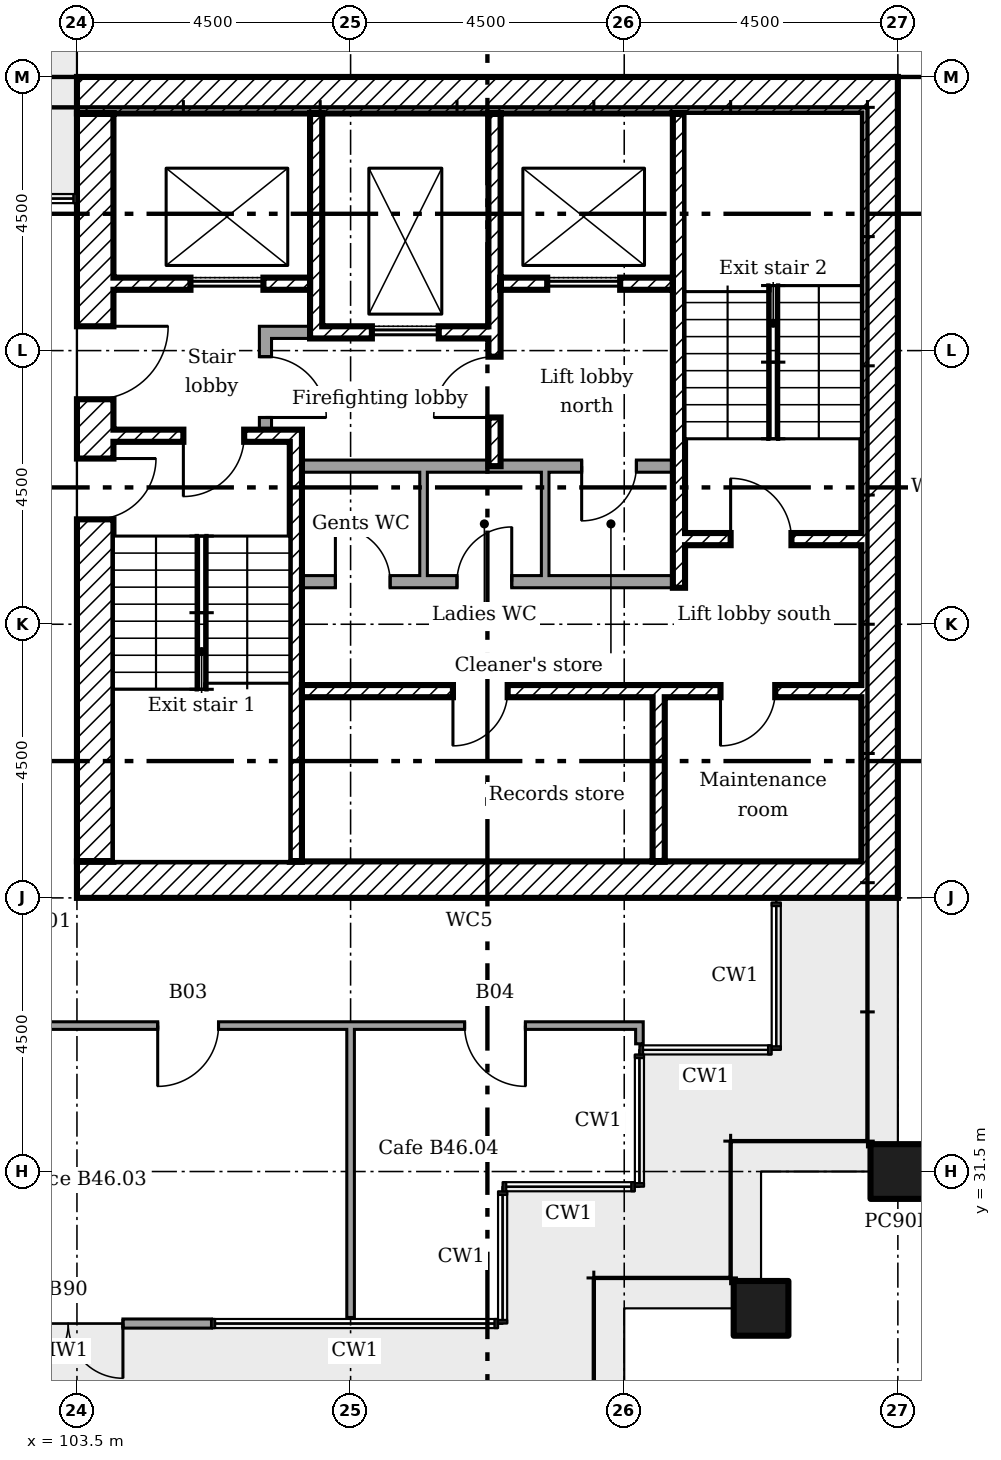
"""IFC4 building model, lengths in metres.
Left out: names, types, materials, properties, quantities, classifications, styles, units other than length and angle.
Written with IfcOpenShell. Run it as: python <this file> out.ifc"""

import sys

from ifc_helpers import new_model, si_unit, direction, frame, frame_2d, origin, origin_2d, place, context, subcontext, project, spatial, rectangle, extrude, element, fill, save


model = new_model("IFC4")
c1 = context("Model", 3, precision=1e-05, world=origin(), true_north=direction((0.0, 1.0)))
c2 = subcontext(c1, "Body", "Model", "MODEL_VIEW")
j1 = project(units=[si_unit("LENGTHUNIT", "METRE"), si_unit("PLANEANGLEUNIT", "RADIAN")], contexts=[c1])
p1 = place(None, origin())
s1 = spatial("IfcSite", under=j1, at=p1, CompositionType="ELEMENT")
p2 = place(p1, origin())
s2 = spatial("IfcBuilding", under=s1, at=p2, CompositionType="ELEMENT")
p3 = place(p2, frame((0.0, 0.0, 183.4)))
s3 = spatial("IfcBuildingStorey", under=s2, at=p3, CompositionType="ELEMENT", Elevation=183.4)
for number, where in (
    (1, (114.75, 29.25, 0.0)),
    (2, (117.0, 31.5, 0.0)),
):
    element("IfcColumn", number, at=place(p3, frame(where)), inside=s3, PredefinedType="COLUMN", context=c2, shape_type="SweptSolid", body=[
        extrude(rectangle(XDim=0.9, YDim=0.9, at=origin_2d()), origin(), (0.0, 0.0, 1.0), 3.6),
    ])
p4 = place(p3, frame((101.0, 29.0, 0.0)))
e3 = element("IfcWall", 3, at=p4, inside=s3, PredefinedType="SOLIDWALL", context=c2, shape_type="SweptSolid", body=[
    extrude(rectangle(XDim=4.712, YDim=0.15, at=frame_2d((2.356, 0.0))), origin(), (0.0, 0.0, 1.0), 3.45),
])
p5 = place(p4, frame((1.456, 0.0, 0.0)))
e4 = element("IfcOpeningElement", 4, at=p5, cuts=e3, PredefinedType="OPENING", context=c2, shape_type="SweptSolid", body=[
    extrude(rectangle(XDim=1.8, YDim=2.4, at=frame_2d((0.9, 1.2))), frame((0.0, 0.085, 0.0), z_axis=(0.0, -1.0, 0.0), x_axis=(1.0, 0.0, 0.0)), (0.0, 0.0, 1.0), 0.17),
])
p6 = place(p3, frame((116.7, 36.0, 0.0), z_axis=(0.0, 0.0, 1.0), x_axis=(0.0, 1.0, 0.0)))
e5 = element("IfcWall", 5, at=p6, inside=s3, PredefinedType="SHEAR", context=c2, shape_type="SweptSolid", body=[
    extrude(rectangle(XDim=13.5, YDim=0.6, at=frame_2d((6.75, 0.0))), origin(), (0.0, 0.0, 1.0), 3.35),
])
for number, where in (
    (6, (103.5, 49.2, 0.0)),
    (7, (103.5, 36.3, 0.0)),
):
    element("IfcWall", number, at=place(p3, frame(where)), inside=s3, PredefinedType="SHEAR", context=c2, shape_type="SweptSolid", body=[
        extrude(rectangle(XDim=12.9, YDim=0.6, at=frame_2d((6.45, 0.0))), origin(), (0.0, 0.0, 1.0), 3.35),
    ])
p7 = place(p3, frame((103.8, 36.6, 0.0), z_axis=(0.0, 0.0, 1.0), x_axis=(0.0, 1.0, 0.0)))
e8 = element("IfcWall", 8, at=p7, inside=s3, PredefinedType="SHEAR", context=c2, shape_type="SweptSolid", body=[
    extrude(rectangle(XDim=12.3, YDim=0.6, at=frame_2d((6.15, 0.0))), origin(), (0.0, 0.0, 1.0), 3.35),
])
p8 = place(p7, frame((7.6, 0.0, 0.0)))
e9 = element("IfcOpeningElement", 9, at=p8, cuts=e8, PredefinedType="OPENING", context=c2, shape_type="SweptSolid", body=[
    extrude(rectangle(XDim=1.2, YDim=2.1, at=frame_2d((0.6, 1.05))), frame((0.0, 0.31, 0.0), z_axis=(0.0, -1.0, 0.0), x_axis=(1.0, 0.0, 0.0)), (0.0, 0.0, 1.0), 0.62),
])
p9 = place(p7, frame((5.625, 0.0, 0.0)))
e10 = element("IfcOpeningElement", 10, at=p9, cuts=e8, PredefinedType="OPENING", context=c2, shape_type="SweptSolid", body=[
    extrude(rectangle(XDim=1.0, YDim=2.1, at=frame_2d((0.5, 1.05))), frame((0.0, 0.31, 0.0), z_axis=(0.0, -1.0, 0.0), x_axis=(1.0, 0.0, 0.0)), (0.0, 0.0, 1.0), 0.62),
])
p10 = place(p3, frame((107.433, 48.9, 0.0), z_axis=(0.0, 0.0, 1.0), x_axis=(0.0, -1.0, 0.0)))
e11 = element("IfcWall", 11, at=p10, inside=s3, PredefinedType="SHEAR", context=c2, shape_type="SweptSolid", body=[
    extrude(rectangle(XDim=3.7, YDim=0.2, at=frame_2d((1.85, 0.0))), origin(), (0.0, 0.0, 1.0), 3.35),
])
p11 = place(p3, frame((110.367, 48.9, 0.0), z_axis=(0.0, 0.0, 1.0), x_axis=(0.0, -1.0, 0.0)))
e12 = element("IfcWall", 12, at=p11, inside=s3, PredefinedType="SHEAR", context=c2, shape_type="SweptSolid", body=[
    extrude(rectangle(XDim=5.8, YDim=0.2, at=frame_2d((2.9, 0.0))), origin(), (0.0, 0.0, 1.0), 3.35),
])
p12 = place(p11, frame((4.0, 0.0, 0.0)))
e13 = element("IfcOpeningElement", 13, at=p12, cuts=e12, PredefinedType="OPENING", context=c2, shape_type="SweptSolid", body=[
    extrude(rectangle(XDim=1.0, YDim=2.1, at=frame_2d((0.5, 1.05))), frame((0.0, 0.11, 0.0), z_axis=(0.0, -1.0, 0.0), x_axis=(1.0, 0.0, 0.0)), (0.0, 0.0, 1.0), 0.22),
])
p13 = place(p3, frame((113.067, 36.6, 0.0), z_axis=(0.0, 0.0, 1.0), x_axis=(0.0, 1.0, 0.0)))
e14 = element("IfcWall", 14, at=p13, inside=s3, PredefinedType="SHEAR", context=c2, shape_type="SweptSolid", body=[
    extrude(rectangle(XDim=2.7, YDim=0.2, at=frame_2d((1.35, 0.0))), origin(), (0.0, 0.0, 1.0), 3.35),
])
p14 = place(p3, frame((106.5, 45.3, 0.0)))
e15 = element("IfcWall", 15, at=p14, inside=s3, PredefinedType="PARTITIONING", context=c2, shape_type="SweptSolid", body=[
    extrude(rectangle(XDim=0.833, YDim=0.2, at=frame_2d((0.417, 0.0))), origin(), (0.0, 0.0, 1.0), 3.35),
])
p15 = place(p3, frame((106.6, 43.7, 0.0), z_axis=(0.0, 0.0, 1.0), x_axis=(0.0, 1.0, 0.0)))
e16 = element("IfcWall", 16, at=p15, inside=s3, PredefinedType="PARTITIONING", context=c2, shape_type="SweptSolid", body=[
    extrude(rectangle(XDim=1.5, YDim=0.2, at=frame_2d((0.75, 0.0))), origin(), (0.0, 0.0, 1.0), 3.35),
])
p16 = place(p15, frame((0.2, 0.0, 0.0)))
e17 = element("IfcOpeningElement", 17, at=p16, cuts=e16, PredefinedType="OPENING", context=c2, shape_type="SweptSolid", body=[
    extrude(rectangle(XDim=1.0, YDim=2.1, at=frame_2d((0.5, 1.05))), frame((0.0, 0.11, 0.0), z_axis=(0.0, -1.0, 0.0), x_axis=(1.0, 0.0, 0.0)), (0.0, 0.0, 1.0), 0.22),
])
p17 = place(p3, frame((104.1, 46.1, 0.0)))
e18 = element("IfcWall", 18, at=p17, inside=s3, PredefinedType="SHEAR", context=c2, shape_type="SweptSolid", body=[
    extrude(rectangle(XDim=3.233, YDim=0.2, at=frame_2d((1.617, 0.0))), origin(), (0.0, 0.0, 1.0), 3.35),
])
p18 = place(p17, frame((1.267, 0.0, 0.0)))
e19 = element("IfcOpeningElement", 19, at=p18, cuts=e18, PredefinedType="OPENING", context=c2, shape_type="SweptSolid", body=[
    extrude(rectangle(XDim=1.2, YDim=2.1, at=frame_2d((0.6, 1.05))), frame((0.0, 0.11, 0.0), z_axis=(0.0, -1.0, 0.0), x_axis=(1.0, 0.0, 0.0)), (0.0, 0.0, 1.0), 0.22),
])
p19 = place(p3, frame((110.467, 46.1, 0.0)))
e20 = element("IfcWall", 20, at=p19, inside=s3, PredefinedType="SHEAR", context=c2, shape_type="SweptSolid", body=[
    extrude(rectangle(XDim=2.833, YDim=0.2, at=frame_2d((1.417, 0.0))), origin(), (0.0, 0.0, 1.0), 3.35),
])
p20 = place(p19, frame((0.767, 0.0, 0.0)))
e21 = element("IfcOpeningElement", 21, at=p20, cuts=e20, PredefinedType="OPENING", context=c2, shape_type="SweptSolid", body=[
    extrude(rectangle(XDim=1.2, YDim=2.1, at=frame_2d((0.6, 1.05))), frame((0.0, 0.11, 0.0), z_axis=(0.0, -1.0, 0.0), x_axis=(1.0, 0.0, 0.0)), (0.0, 0.0, 1.0), 0.22),
])
p21 = place(p3, frame((107.533, 45.3, 0.0)))
e22 = element("IfcWall", 22, at=p21, inside=s3, PredefinedType="SHEAR", context=c2, shape_type="SweptSolid", body=[
    extrude(rectangle(XDim=2.733, YDim=0.2, at=frame_2d((1.367, 0.0))), origin(), (0.0, 0.0, 1.0), 3.35),
])
p22 = place(p21, frame((0.817, 0.0, 0.0)))
e23 = element("IfcOpeningElement", 23, at=p22, cuts=e22, PredefinedType="OPENING", context=c2, shape_type="SweptSolid", body=[
    extrude(rectangle(XDim=1.1, YDim=2.1, at=frame_2d((0.55, 1.05))), frame((0.0, 0.11, 0.0), z_axis=(0.0, -1.0, 0.0), x_axis=(1.0, 0.0, 0.0)), (0.0, 0.0, 1.0), 0.22),
])
p23 = place(p3, frame((107.2, 39.4, 0.0)))
e24 = element("IfcWall", 24, at=p23, inside=s3, PredefinedType="SHEAR", context=c2, shape_type="SweptSolid", body=[
    extrude(rectangle(XDim=9.2, YDim=0.2, at=frame_2d((4.6, 0.0))), origin(), (0.0, 0.0, 1.0), 3.35),
])
p24 = place(p23, frame((2.483, 0.0, 0.0)))
e25 = element("IfcOpeningElement", 25, at=p24, cuts=e24, PredefinedType="OPENING", context=c2, shape_type="SweptSolid", body=[
    extrude(rectangle(XDim=0.9, YDim=2.1, at=frame_2d((0.45, 1.05))), frame((0.0, 0.11, 0.0), z_axis=(0.0, -1.0, 0.0), x_axis=(1.0, 0.0, 0.0)), (0.0, 0.0, 1.0), 0.22),
])
p25 = place(p23, frame((6.883, 0.0, 0.0)))
e26 = element("IfcOpeningElement", 26, at=p25, cuts=e24, PredefinedType="OPENING", context=c2, shape_type="SweptSolid", body=[
    extrude(rectangle(XDim=0.9, YDim=2.1, at=frame_2d((0.45, 1.05))), frame((0.0, 0.11, 0.0), z_axis=(0.0, -1.0, 0.0), x_axis=(1.0, 0.0, 0.0)), (0.0, 0.0, 1.0), 0.22),
])
p26 = place(p3, frame((107.1, 36.6, 0.0), z_axis=(0.0, 0.0, 1.0), x_axis=(0.0, 1.0, 0.0)))
e27 = element("IfcWall", 27, at=p26, inside=s3, PredefinedType="SHEAR", context=c2, shape_type="SweptSolid", body=[
    extrude(rectangle(XDim=7.1, YDim=0.2, at=frame_2d((3.55, 0.0))), origin(), (0.0, 0.0, 1.0), 3.35),
])
p27 = place(p3, frame((104.1, 43.6, 0.0)))
e28 = element("IfcWall", 28, at=p27, inside=s3, PredefinedType="SHEAR", context=c2, shape_type="SweptSolid", body=[
    extrude(rectangle(XDim=2.9, YDim=0.2, at=frame_2d((1.45, 0.0))), origin(), (0.0, 0.0, 1.0), 3.35),
])
p28 = place(p27, frame((1.15, 0.0, 0.0)))
e29 = element("IfcOpeningElement", 29, at=p28, cuts=e28, PredefinedType="OPENING", context=c2, shape_type="SweptSolid", body=[
    extrude(rectangle(XDim=1.0, YDim=2.1, at=frame_2d((0.5, 1.05))), frame((0.0, 0.11, 0.0), z_axis=(0.0, -1.0, 0.0), x_axis=(1.0, 0.0, 0.0)), (0.0, 0.0, 1.0), 0.22),
])
p29 = place(p3, frame((113.5, 41.9, 0.0)))
e30 = element("IfcWall", 30, at=p29, inside=s3, PredefinedType="SHEAR", context=c2, shape_type="SweptSolid", body=[
    extrude(rectangle(XDim=2.9, YDim=0.2, at=frame_2d((1.45, 0.0))), origin(), (0.0, 0.0, 1.0), 3.35),
])
p30 = place(p29, frame((0.75, 0.0, 0.0)))
e31 = element("IfcOpeningElement", 31, at=p30, cuts=e30, PredefinedType="OPENING", context=c2, shape_type="SweptSolid", body=[
    extrude(rectangle(XDim=1.0, YDim=2.1, at=frame_2d((0.5, 1.05))), frame((0.0, 0.11, 0.0), z_axis=(0.0, -1.0, 0.0), x_axis=(1.0, 0.0, 0.0)), (0.0, 0.0, 1.0), 0.22),
])
p31 = place(p3, frame((113.4, 41.1, 0.0), z_axis=(0.0, 0.0, 1.0), x_axis=(0.0, 1.0, 0.0)))
e32 = element("IfcWall", 32, at=p31, inside=s3, PredefinedType="SHEAR", context=c2, shape_type="SweptSolid", body=[
    extrude(rectangle(XDim=7.8, YDim=0.2, at=frame_2d((3.9, 0.0))), origin(), (0.0, 0.0, 1.0), 3.35),
])
p32 = place(p3, frame((107.2, 43.1, 0.0)))
e33 = element("IfcWall", 33, at=p32, inside=s3, PredefinedType="PARTITIONING", context=c2, shape_type="SweptSolid", body=[
    extrude(rectangle(XDim=6.1, YDim=0.2, at=frame_2d((3.05, 0.0))), origin(), (0.0, 0.0, 1.0), 3.35),
])
p33 = place(p32, frame((4.6, 0.0, 0.0)))
e34 = element("IfcOpeningElement", 34, at=p33, cuts=e33, PredefinedType="OPENING", context=c2, shape_type="SweptSolid", body=[
    extrude(rectangle(XDim=0.9, YDim=2.1, at=frame_2d((0.45, 1.05))), frame((0.0, 0.11, 0.0), z_axis=(0.0, -1.0, 0.0), x_axis=(1.0, 0.0, 0.0)), (0.0, 0.0, 1.0), 0.22),
])
p34 = place(p3, frame((107.2, 41.2, 0.0)))
e35 = element("IfcWall", 35, at=p34, inside=s3, PredefinedType="PARTITIONING", context=c2, shape_type="SweptSolid", body=[
    extrude(rectangle(XDim=6.1, YDim=0.2, at=frame_2d((3.05, 0.0))), origin(), (0.0, 0.0, 1.0), 3.35),
])
p35 = place(p34, frame((0.55, 0.0, 0.0)))
e36 = element("IfcOpeningElement", 36, at=p35, cuts=e35, PredefinedType="OPENING", context=c2, shape_type="SweptSolid", body=[
    extrude(rectangle(XDim=0.9, YDim=2.1, at=frame_2d((0.45, 1.05))), frame((0.0, 0.11, 0.0), z_axis=(0.0, -1.0, 0.0), x_axis=(1.0, 0.0, 0.0)), (0.0, 0.0, 1.0), 0.22),
])
p36 = place(p34, frame((2.55, 0.0, 0.0)))
e37 = element("IfcOpeningElement", 37, at=p36, cuts=e35, PredefinedType="OPENING", context=c2, shape_type="SweptSolid", body=[
    extrude(rectangle(XDim=0.9, YDim=2.1, at=frame_2d((0.45, 1.05))), frame((0.0, 0.11, 0.0), z_axis=(0.0, -1.0, 0.0), x_axis=(1.0, 0.0, 0.0)), (0.0, 0.0, 1.0), 0.22),
])
for number, where, z_axis, x_axis in (
    (38, (109.2, 41.3, 0.0), (0.0, 0.0, 1.0), (0.0, 1.0, 0.0)),
    (39, (111.2, 41.3, 0.0), (0.0, 0.0, 1.0), (0.0, 1.0, 0.0)),
):
    element("IfcWall", number, at=place(p3, frame(where, z_axis=z_axis, x_axis=x_axis)), inside=s3, PredefinedType="PARTITIONING", context=c2, shape_type="SweptSolid", body=[
        extrude(rectangle(XDim=1.7, YDim=0.125, at=frame_2d((0.85, 0.0))), origin(), (0.0, 0.0, 1.0), 3.35),
    ])
p37 = place(p3, frame((100.137, 33.9, 0.0)))
e40 = element("IfcWall", 40, at=p37, inside=s3, PredefinedType="PARTITIONING", context=c2, shape_type="SweptSolid", body=[
    extrude(rectangle(XDim=12.675, YDim=0.125, at=frame_2d((6.337, 0.0))), origin(), (0.0, 0.0, 1.0), 3.45),
])
p38 = place(p37, frame((4.69, 0.0, 0.0)))
e41 = element("IfcOpeningElement", 41, at=p38, cuts=e40, PredefinedType="OPENING", context=c2, shape_type="SweptSolid", body=[
    extrude(rectangle(XDim=1.0, YDim=2.1, at=frame_2d((0.5, 1.05))), frame((0.0, 0.073, 0.0), z_axis=(0.0, -1.0, 0.0), x_axis=(1.0, 0.0, 0.0)), (0.0, 0.0, 1.0), 0.145),
])
p39 = place(p37, frame((9.738, 0.0, 0.0)))
e42 = element("IfcOpeningElement", 42, at=p39, cuts=e40, PredefinedType="OPENING", context=c2, shape_type="SweptSolid", body=[
    extrude(rectangle(XDim=1.0, YDim=2.1, at=frame_2d((0.5, 1.05))), frame((0.0, 0.073, 0.0), z_axis=(0.0, -1.0, 0.0), x_axis=(1.0, 0.0, 0.0)), (0.0, 0.0, 1.0), 0.145),
])
p40 = place(p3, frame((108.0, 29.1, 0.0), z_axis=(0.0, 0.0, 1.0), x_axis=(0.0, 1.0, 0.0)))
e43 = element("IfcWall", 43, at=p40, inside=s3, PredefinedType="PARTITIONING", context=c2, shape_type="SweptSolid", body=[
    extrude(rectangle(XDim=4.8, YDim=0.125, at=frame_2d((2.4, 0.0))), origin(), (0.0, 0.0, 1.0), 2.851),
])
p41 = place(p3, frame((112.75, 33.6, 0.0), z_axis=(0.0, 0.0, 1.0), x_axis=(0.0, 1.0, 0.0)))
e44 = element("IfcWall", 44, at=p41, inside=s3, PredefinedType="PARTITIONING", context=c2, shape_type="SweptSolid", body=[
    extrude(rectangle(XDim=0.237, YDim=0.125, at=frame_2d((0.119, 0.0))), origin(), (0.0, 0.0, 1.0), 3.45),
])
p42 = place(p5, frame((1.8, 0.0, 0.0), x_axis=(-1.0, 0.0, 0.0)))
e45 = element("IfcDoor", 45, at=p42, inside=s3, OperationType="DOUBLE_DOOR_DOUBLE_SWING", PredefinedType="NOTDEFINED", context=c2, shape_type="SweptSolid", body=[
    extrude(rectangle(XDim=1.8, YDim=2.4, at=frame_2d((0.9, 1.2))), frame((0.0, 0.025, 0.0), z_axis=(0.0, -1.0, 0.0), x_axis=(1.0, 0.0, 0.0)), (0.0, 0.0, 1.0), 0.05),
])
fill(e4, e45)
p43 = place(p8, frame((1.2, 0.0, 0.0), x_axis=(-1.0, 0.0, 0.0)))
e46 = element("IfcDoor", 46, at=p43, inside=s3, OperationType="SINGLE_SWING_RIGHT", PredefinedType="DOOR", context=c2, shape_type="SweptSolid", body=[
    extrude(rectangle(XDim=1.2, YDim=2.1, at=frame_2d((0.6, 1.05))), frame((0.0, 0.025, 0.0), z_axis=(0.0, -1.0, 0.0), x_axis=(1.0, 0.0, 0.0)), (0.0, 0.0, 1.0), 0.05),
])
fill(e9, e46)
p44 = place(p28, frame((1.0, 0.0, 0.0), x_axis=(-1.0, 0.0, 0.0)))
e47 = element("IfcDoor", 47, at=p44, inside=s3, OperationType="SINGLE_SWING_LEFT", PredefinedType="DOOR", context=c2, shape_type="SweptSolid", body=[
    extrude(rectangle(XDim=1.0, YDim=2.1, at=frame_2d((0.5, 1.05))), frame((0.0, 0.025, 0.0), z_axis=(0.0, -1.0, 0.0), x_axis=(1.0, 0.0, 0.0)), (0.0, 0.0, 1.0), 0.05),
])
fill(e29, e47)
p45 = place(p9, frame((1.0, 0.0, 0.0), x_axis=(-1.0, 0.0, 0.0)))
e48 = element("IfcDoor", 48, at=p45, inside=s3, OperationType="SINGLE_SWING_RIGHT", PredefinedType="DOOR", context=c2, shape_type="SweptSolid", body=[
    extrude(rectangle(XDim=1.0, YDim=2.1, at=frame_2d((0.5, 1.05))), frame((0.0, 0.025, 0.0), z_axis=(0.0, -1.0, 0.0), x_axis=(1.0, 0.0, 0.0)), (0.0, 0.0, 1.0), 0.05),
])
fill(e10, e48)
p46 = place(p30, origin())
e49 = element("IfcDoor", 49, at=p46, inside=s3, OperationType="SINGLE_SWING_RIGHT", PredefinedType="DOOR", context=c2, shape_type="SweptSolid", body=[
    extrude(rectangle(XDim=1.0, YDim=2.1, at=frame_2d((0.5, 1.05))), frame((0.0, 0.025, 0.0), z_axis=(0.0, -1.0, 0.0), x_axis=(1.0, 0.0, 0.0)), (0.0, 0.0, 1.0), 0.05),
])
fill(e31, e49)
p47 = place(p12, frame((1.0, 0.0, 0.0), x_axis=(-1.0, 0.0, 0.0)))
e50 = element("IfcDoor", 50, at=p47, inside=s3, OperationType="SINGLE_SWING_RIGHT", PredefinedType="DOOR", context=c2, shape_type="SweptSolid", body=[
    extrude(rectangle(XDim=1.0, YDim=2.1, at=frame_2d((0.5, 1.05))), frame((0.0, 0.025, 0.0), z_axis=(0.0, -1.0, 0.0), x_axis=(1.0, 0.0, 0.0)), (0.0, 0.0, 1.0), 0.05),
])
fill(e13, e50)
p48 = place(p16, frame((1.0, 0.0, 0.0), x_axis=(-1.0, 0.0, 0.0)))
e51 = element("IfcDoor", 51, at=p48, inside=s3, OperationType="SINGLE_SWING_LEFT", PredefinedType="DOOR", context=c2, shape_type="SweptSolid", body=[
    extrude(rectangle(XDim=1.0, YDim=2.1, at=frame_2d((0.5, 1.05))), frame((0.0, 0.025, 0.0), z_axis=(0.0, -1.0, 0.0), x_axis=(1.0, 0.0, 0.0)), (0.0, 0.0, 1.0), 0.05),
])
fill(e17, e51)
p49 = place(p24, frame((0.9, 0.0, 0.0), x_axis=(-1.0, 0.0, 0.0)))
e52 = element("IfcDoor", 52, at=p49, inside=s3, OperationType="SINGLE_SWING_LEFT", PredefinedType="DOOR", context=c2, shape_type="SweptSolid", body=[
    extrude(rectangle(XDim=0.9, YDim=2.1, at=frame_2d((0.45, 1.05))), frame((0.0, 0.025, 0.0), z_axis=(0.0, -1.0, 0.0), x_axis=(1.0, 0.0, 0.0)), (0.0, 0.0, 1.0), 0.05),
])
fill(e25, e52)
p50 = place(p25, frame((0.9, 0.0, 0.0), x_axis=(-1.0, 0.0, 0.0)))
e53 = element("IfcDoor", 53, at=p50, inside=s3, OperationType="SINGLE_SWING_LEFT", PredefinedType="DOOR", context=c2, shape_type="SweptSolid", body=[
    extrude(rectangle(XDim=0.9, YDim=2.1, at=frame_2d((0.45, 1.05))), frame((0.0, 0.025, 0.0), z_axis=(0.0, -1.0, 0.0), x_axis=(1.0, 0.0, 0.0)), (0.0, 0.0, 1.0), 0.05),
])
fill(e26, e53)
p51 = place(p35, origin())
e54 = element("IfcDoor", 54, at=p51, inside=s3, OperationType="SINGLE_SWING_RIGHT", PredefinedType="DOOR", context=c2, shape_type="SweptSolid", body=[
    extrude(rectangle(XDim=0.9, YDim=2.1, at=frame_2d((0.45, 1.05))), frame((0.0, 0.025, 0.0), z_axis=(0.0, -1.0, 0.0), x_axis=(1.0, 0.0, 0.0)), (0.0, 0.0, 1.0), 0.05),
])
fill(e36, e54)
p52 = place(p36, origin())
e55 = element("IfcDoor", 55, at=p52, inside=s3, OperationType="SINGLE_SWING_LEFT", PredefinedType="DOOR", context=c2, shape_type="SweptSolid", body=[
    extrude(rectangle(XDim=0.9, YDim=2.1, at=frame_2d((0.45, 1.05))), frame((0.0, 0.025, 0.0), z_axis=(0.0, -1.0, 0.0), x_axis=(1.0, 0.0, 0.0)), (0.0, 0.0, 1.0), 0.05),
])
fill(e37, e55)
p53 = place(p33, frame((0.9, 0.0, 0.0), x_axis=(-1.0, 0.0, 0.0)))
e56 = element("IfcDoor", 56, at=p53, inside=s3, OperationType="SINGLE_SWING_LEFT", PredefinedType="DOOR", context=c2, shape_type="SweptSolid", body=[
    extrude(rectangle(XDim=0.9, YDim=2.1, at=frame_2d((0.45, 1.05))), frame((0.0, 0.025, 0.0), z_axis=(0.0, -1.0, 0.0), x_axis=(1.0, 0.0, 0.0)), (0.0, 0.0, 1.0), 0.05),
])
fill(e34, e56)
p54 = place(p22, origin())
e57 = element("IfcDoor", 57, at=p54, inside=s3, OperationType="SLIDING_TO_LEFT", PredefinedType="DOOR", context=c2, shape_type="SweptSolid", body=[
    extrude(rectangle(XDim=1.1, YDim=2.1, at=frame_2d((0.55, 1.05))), frame((0.0, 0.025, 0.0), z_axis=(0.0, -1.0, 0.0), x_axis=(1.0, 0.0, 0.0)), (0.0, 0.0, 1.0), 0.05),
])
fill(e23, e57)
p55 = place(p18, origin())
e58 = element("IfcDoor", 58, at=p55, inside=s3, OperationType="SLIDING_TO_LEFT", PredefinedType="DOOR", context=c2, shape_type="SweptSolid", body=[
    extrude(rectangle(XDim=1.2, YDim=2.1, at=frame_2d((0.6, 1.05))), frame((0.0, 0.025, 0.0), z_axis=(0.0, -1.0, 0.0), x_axis=(1.0, 0.0, 0.0)), (0.0, 0.0, 1.0), 0.05),
])
fill(e19, e58)
p56 = place(p20, origin())
e59 = element("IfcDoor", 59, at=p56, inside=s3, OperationType="SLIDING_TO_LEFT", PredefinedType="DOOR", context=c2, shape_type="SweptSolid", body=[
    extrude(rectangle(XDim=1.2, YDim=2.1, at=frame_2d((0.6, 1.05))), frame((0.0, 0.025, 0.0), z_axis=(0.0, -1.0, 0.0), x_axis=(1.0, 0.0, 0.0)), (0.0, 0.0, 1.0), 0.05),
])
fill(e21, e59)
p57 = place(p38, frame((1.0, 0.0, 0.0), x_axis=(-1.0, 0.0, 0.0)))
e60 = element("IfcDoor", 60, at=p57, inside=s3, OperationType="SINGLE_SWING_LEFT", PredefinedType="DOOR", context=c2, shape_type="SweptSolid", body=[
    extrude(rectangle(XDim=1.0, YDim=2.1, at=frame_2d((0.5, 1.05))), frame((0.0, 0.025, 0.0), z_axis=(0.0, -1.0, 0.0), x_axis=(1.0, 0.0, 0.0)), (0.0, 0.0, 1.0), 0.05),
])
fill(e41, e60)
p58 = place(p39, frame((1.0, 0.0, 0.0), x_axis=(-1.0, 0.0, 0.0)))
e61 = element("IfcDoor", 61, at=p58, inside=s3, OperationType="SINGLE_SWING_RIGHT", PredefinedType="DOOR", context=c2, shape_type="SweptSolid", body=[
    extrude(rectangle(XDim=1.0, YDim=2.1, at=frame_2d((0.5, 1.05))), frame((0.0, 0.025, 0.0), z_axis=(0.0, -1.0, 0.0), x_axis=(1.0, 0.0, 0.0)), (0.0, 0.0, 1.0), 0.05),
])
fill(e42, e61)
save(model, sys.argv[1])
